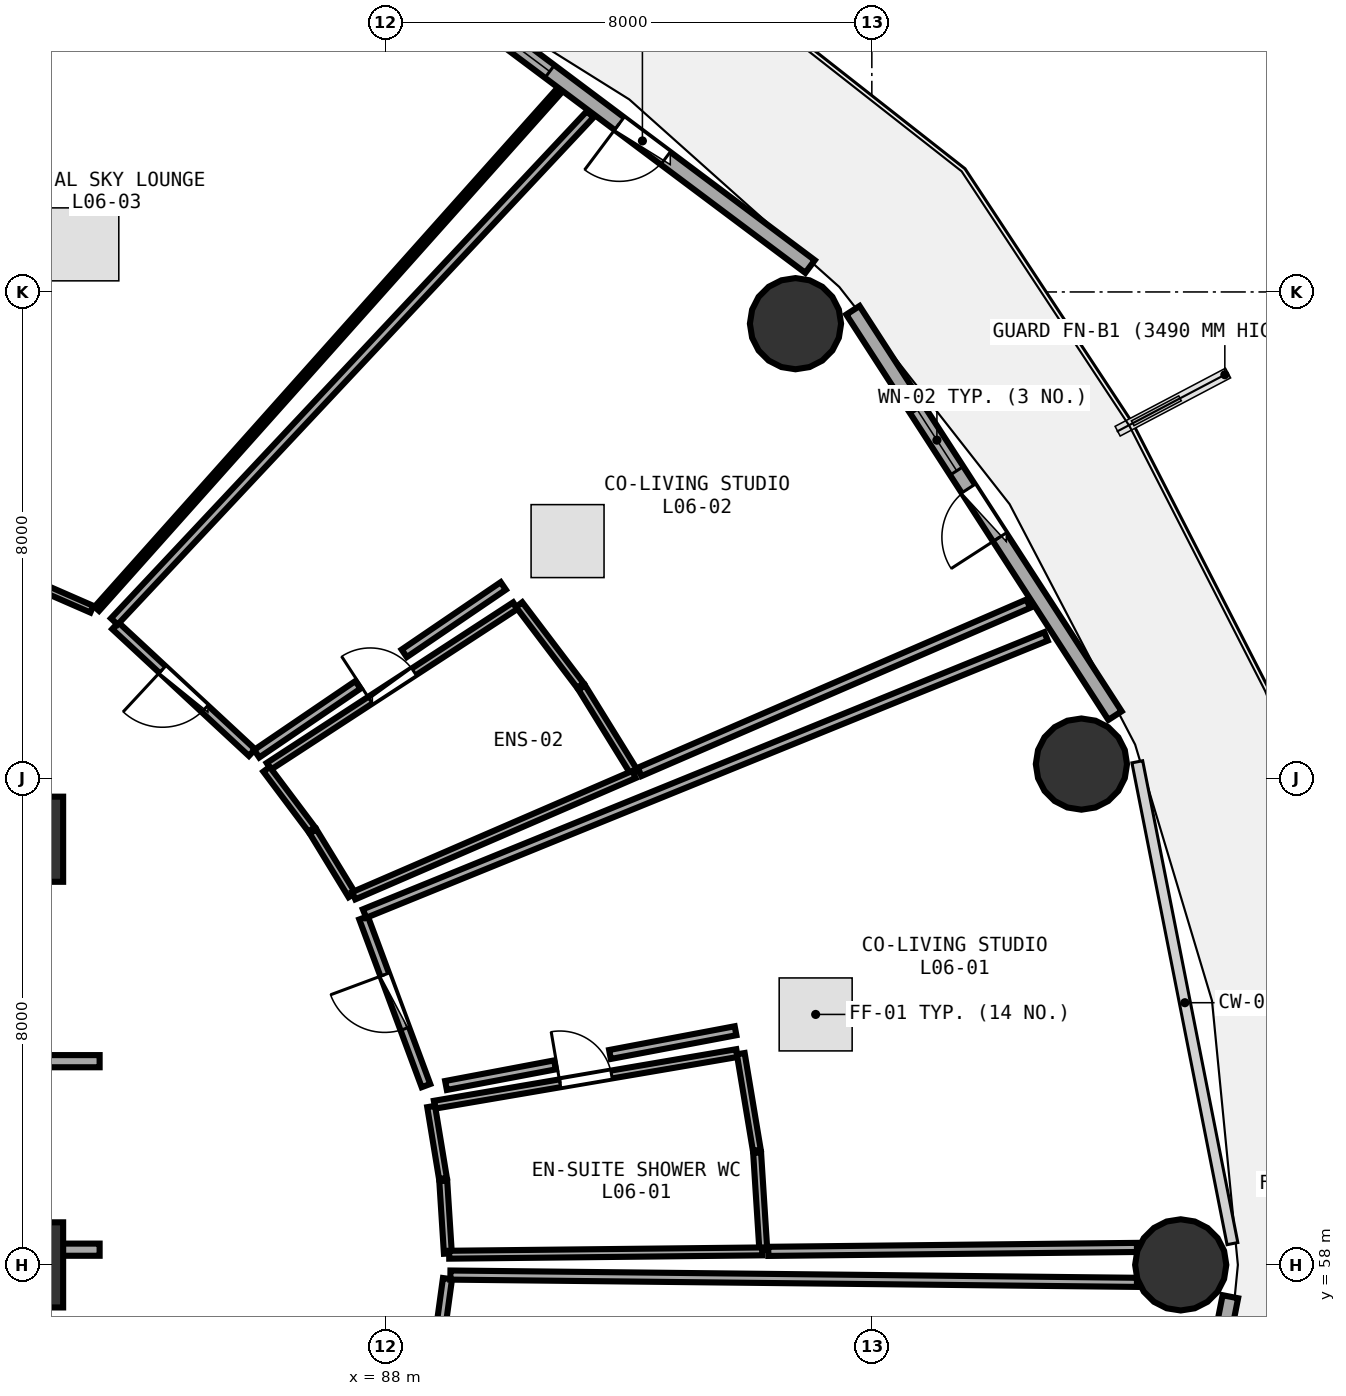
"""IFC4 building model, lengths in metres.
Left out: names, types, materials, properties, quantities, classifications, styles, units other than length and angle.
Written with IfcOpenShell. Run it as: python <this file> out.ifc"""

import sys

from ifc_helpers import new_model, si_unit, direction, frame, frame_2d, origin, origin_2d, place, context, subcontext, project, spatial, rectangle, circle, extrude, element, fill, save


model = new_model("IFC4")
c1 = context("Model", 3, precision=1e-05, world=origin(), true_north=direction((0.0, 1.0)))
c2 = subcontext(c1, "Body", "Model", "MODEL_VIEW")
j1 = project(units=[si_unit("LENGTHUNIT", "METRE"), si_unit("PLANEANGLEUNIT", "RADIAN")], contexts=[c1])
p1 = place(None, origin())
s1 = spatial("IfcSite", under=j1, at=p1, CompositionType="ELEMENT")
p2 = place(p1, origin())
s2 = spatial("IfcBuilding", under=s1, at=p2, CompositionType="ELEMENT")
p3 = place(p2, frame((0.0, 0.0, 26.25)))
s3 = spatial("IfcBuildingStorey", under=s2, at=p3, CompositionType="ELEMENT", Elevation=26.25)
for number, where, z_axis, x_axis in (
    (1, (82.0, 58.0, 0.0), (0.0, 0.0, 1.0), (1.0, 0.0, 0.0)),
    (2, (82.0, 65.0, 0.0), (0.0, 0.0, 1.0), (1.0, 0.0, 0.0)),
):
    element("IfcColumn", number, at=place(p3, frame(where, z_axis=z_axis, x_axis=x_axis)), inside=s3, PredefinedType="PILASTER", context=c2, shape_type="SweptSolid", body=[
        extrude(rectangle(XDim=1.4, YDim=1.4, at=origin_2d()), origin(), (0.0, 0.0, 1.0), 3.75),
    ])
for number, where, z_axis, x_axis in (
    (3, (101.08, 58.0, 0.0), (0.0, 0.0, 1.0), (1.0, 0.0, 0.0)),
    (4, (99.447, 66.236, 0.0), (0.0, 0.0, 1.0), (1.0, 0.0, 0.0)),
    (5, (94.744, 73.478, 0.0), (0.0, 0.0, 1.0), (1.0, 0.0, 0.0)),
):
    element("IfcColumn", number, at=place(p3, frame(where, z_axis=z_axis, x_axis=x_axis)), inside=s3, PredefinedType="COLUMN", context=c2, shape_type="SweptSolid", body=[
        extrude(circle(Radius=0.75, at=origin_2d()), origin(), (0.0, 0.0, 1.0), 3.75),
    ])
p4 = place(p3, frame((99.999, 67.033, 0.0), z_axis=(0.0, 0.0, 1.0), x_axis=(-0.543005114258, 0.839729388488, 0.0)))
e6 = element("IfcWall", 6, at=p4, inside=s3, PredefinedType="SOLIDWALL", context=c2, shape_type="SweptSolid", body=[
    extrude(rectangle(XDim=7.938, YDim=0.26, at=frame_2d((3.969, 0.0))), origin(), (0.0, 0.0, 1.0), 3.475),
])
p5 = place(p4, frame((3.494, 0.0, 0.0)))
e7 = element("IfcOpeningElement", 7, at=p5, cuts=e6, PredefinedType="OPENING", context=c2, shape_type="SweptSolid", body=[
    extrude(rectangle(XDim=0.95, YDim=2.1, at=frame_2d((0.475, 1.05))), frame((0.0, 0.14, 0.0), z_axis=(0.0, -1.0, 0.0), x_axis=(1.0, 0.0, 0.0)), (0.0, 0.0, 1.0), 0.28),
])
p6 = place(p4, frame((4.794, 0.0, 0.85)))
e8 = element("IfcOpeningElement", 8, at=p6, cuts=e6, PredefinedType="OPENING", context=c2, shape_type="SweptSolid", body=[
    extrude(rectangle(XDim=1.2, YDim=1.45, at=frame_2d((0.6, 0.725))), frame((0.0, 0.14, 0.0), z_axis=(0.0, -1.0, 0.0), x_axis=(1.0, 0.0, 0.0)), (0.0, 0.0, 1.0), 0.28),
])
p7 = place(p3, frame((94.984, 74.418, 0.0), z_axis=(0.0, 0.0, 1.0), x_axis=(-0.80030733173, 0.599590005569, 0.0)))
e9 = element("IfcWall", 9, at=p7, inside=s3, PredefinedType="SOLIDWALL", context=c2, shape_type="SweptSolid", body=[
    extrude(rectangle(XDim=8.291, YDim=0.26, at=frame_2d((4.145, 0.0))), origin(), (0.0, 0.0, 1.0), 3.475),
])
p8 = place(p7, frame((2.97, 0.0, 0.0)))
e10 = element("IfcOpeningElement", 10, at=p8, cuts=e9, PredefinedType="OPENING", context=c2, shape_type="SweptSolid", body=[
    extrude(rectangle(XDim=0.95, YDim=2.1, at=frame_2d((0.475, 1.05))), frame((0.0, 0.14, 0.0), z_axis=(0.0, -1.0, 0.0), x_axis=(1.0, 0.0, 0.0)), (0.0, 0.0, 1.0), 0.28),
])
p9 = place(p7, frame((5.35, 0.0, 0.85)))
e11 = element("IfcOpeningElement", 11, at=p9, cuts=e9, PredefinedType="OPENING", context=c2, shape_type="SweptSolid", body=[
    extrude(rectangle(XDim=1.2, YDim=1.45, at=frame_2d((0.6, 0.725))), frame((0.0, 0.14, 0.0), z_axis=(0.0, -1.0, 0.0), x_axis=(1.0, 0.0, 0.0)), (0.0, 0.0, 1.0), 0.28),
])
p10 = place(p3, frame((100.404, 49.92, 0.0), z_axis=(0.0, 0.0, 1.0), x_axis=(0.193726159581, 0.98105564322, 0.0)))
e12 = element("IfcWall", 12, at=p10, inside=s3, PredefinedType="SOLIDWALL", context=c2, shape_type="SweptSolid", body=[
    extrude(rectangle(XDim=7.703, YDim=0.26, at=frame_2d((3.851, 0.0))), origin(), (0.0, 0.0, 1.0), 3.475),
])
p11 = place(p10, frame((3.051, 0.0, 0.85)))
e13 = element("IfcOpeningElement", 13, at=p11, cuts=e12, PredefinedType="OPENING", context=c2, shape_type="SweptSolid", body=[
    extrude(rectangle(XDim=1.6, YDim=1.45, at=frame_2d((0.8, 0.725))), frame((0.0, 0.14, 0.0), z_axis=(0.0, -1.0, 0.0), x_axis=(1.0, 0.0, 0.0)), (0.0, 0.0, 1.0), 0.28),
])
p12 = place(p3, frame((79.3, 61.35, 0.0), z_axis=(0.0, 0.0, 1.0), x_axis=(1.0, 0.0, 0.0)))
e14 = element("IfcWall", 14, at=p12, inside=s3, PredefinedType="SOLIDWALL", context=c2, shape_type="SweptSolid", body=[
    extrude(rectangle(XDim=4.0, YDim=0.2, at=frame_2d((2.0, 0.0))), origin(), (0.0, 0.0, 1.0), 2.775),
])
p13 = place(p12, frame((0.45, 0.0, 0.0)))
e15 = element("IfcOpeningElement", 15, at=p13, cuts=e14, PredefinedType="OPENING", context=c2, shape_type="SweptSolid", body=[
    extrude(rectangle(XDim=1.2, YDim=2.15, at=frame_2d((0.6, 1.075))), frame((0.0, 0.11, 0.0), z_axis=(0.0, -1.0, 0.0), x_axis=(1.0, 0.0, 0.0)), (0.0, 0.0, 1.0), 0.22),
])
p14 = place(p3, frame((79.3, 58.25, 0.0), z_axis=(0.0, 0.0, 1.0), x_axis=(1.0, 0.0, 0.0)))
e16 = element("IfcWall", 16, at=p14, inside=s3, PredefinedType="SOLIDWALL", context=c2, shape_type="SweptSolid", body=[
    extrude(rectangle(XDim=4.0, YDim=0.2, at=frame_2d((2.0, 0.0))), origin(), (0.0, 0.0, 1.0), 2.775),
])
p15 = place(p14, frame((0.5, 0.0, 0.0)))
e17 = element("IfcOpeningElement", 17, at=p15, cuts=e16, PredefinedType="OPENING", context=c2, shape_type="SweptSolid", body=[
    extrude(rectangle(XDim=1.1, YDim=2.1, at=frame_2d((0.55, 1.05))), frame((0.0, 0.11, 0.0), z_axis=(0.0, -1.0, 0.0), x_axis=(1.0, 0.0, 0.0)), (0.0, 0.0, 1.0), 0.22),
])
p16 = place(p3, frame((88.808, 60.634, 0.0), z_axis=(0.0, 0.0, 1.0), x_axis=(0.985746995542, 0.168234540986, 0.0)))
e18 = element("IfcWall", 18, at=p16, inside=s3, PredefinedType="PLUMBINGWALL", context=c2, shape_type="SweptSolid", body=[
    extrude(rectangle(XDim=5.046, YDim=0.13, at=frame_2d((2.523, 0.0))), origin(), (0.0, 0.0, 1.0), 3.175),
])
p17 = place(p16, frame((2.093, 0.0, 0.0)))
e19 = element("IfcOpeningElement", 19, at=p17, cuts=e18, PredefinedType="OPENING", context=c2, shape_type="SweptSolid", body=[
    extrude(rectangle(XDim=0.86, YDim=2.05, at=frame_2d((0.43, 1.025))), frame((0.0, 0.075, 0.0), z_axis=(0.0, -1.0, 0.0), x_axis=(1.0, 0.0, 0.0)), (0.0, 0.0, 1.0), 0.15),
])
p18 = place(p3, frame((88.667, 60.948, 0.0), z_axis=(0.0, 0.0, 1.0), x_axis=(-0.348640514247, 0.937256524024, 0.0)))
e20 = element("IfcWall", 20, at=p18, inside=s3, PredefinedType="PARTITIONING", context=c2, shape_type="SweptSolid", body=[
    extrude(rectangle(XDim=2.943, YDim=0.15, at=frame_2d((1.472, 0.0))), origin(), (0.0, 0.0, 1.0), 3.48),
])
p19 = place(p18, frame((0.997, 0.0, 0.0)))
e21 = element("IfcOpeningElement", 21, at=p19, cuts=e20, PredefinedType="OPENING", context=c2, shape_type="SweptSolid", body=[
    extrude(rectangle(XDim=0.95, YDim=2.08, at=frame_2d((0.475, 1.04))), frame((0.0, 0.085, 0.0), z_axis=(0.0, -1.0, 0.0), x_axis=(1.0, 0.0, 0.0)), (0.0, 0.0, 1.0), 0.17),
])
p20 = place(p3, frame((86.083, 66.2, 0.0), z_axis=(0.0, 0.0, 1.0), x_axis=(0.837796261941, 0.545982988267, 0.0)))
e22 = element("IfcWall", 22, at=p20, inside=s3, PredefinedType="PLUMBINGWALL", context=c2, shape_type="SweptSolid", body=[
    extrude(rectangle(XDim=4.838, YDim=0.13, at=frame_2d((2.419, 0.0))), origin(), (0.0, 0.0, 1.0), 3.235),
])
p21 = place(p20, frame((1.989, 0.0, 0.0)))
e23 = element("IfcOpeningElement", 23, at=p21, cuts=e22, PredefinedType="OPENING", context=c2, shape_type="SweptSolid", body=[
    extrude(rectangle(XDim=0.86, YDim=2.05, at=frame_2d((0.43, 1.025))), frame((0.0, 0.075, 0.0), z_axis=(0.0, -1.0, 0.0), x_axis=(1.0, 0.0, 0.0)), (0.0, 0.0, 1.0), 0.15),
])
p22 = place(p3, frame((85.806, 66.425, 0.0), z_axis=(0.0, 0.0, 1.0), x_axis=(-0.7329267348, 0.680307578538, 0.0)))
e24 = element("IfcWall", 24, at=p22, inside=s3, PredefinedType="PARTITIONING", context=c2, shape_type="SweptSolid", body=[
    extrude(rectangle(XDim=3.067, YDim=0.15, at=frame_2d((1.533, 0.0))), origin(), (0.0, 0.0, 1.0), 2.875),
])
p23 = place(p22, frame((1.059, 0.0, 0.0)))
e25 = element("IfcOpeningElement", 25, at=p23, cuts=e24, PredefinedType="OPENING", context=c2, shape_type="SweptSolid", body=[
    extrude(rectangle(XDim=0.95, YDim=2.08, at=frame_2d((0.475, 1.04))), frame((0.0, 0.085, 0.0), z_axis=(0.0, -1.0, 0.0), x_axis=(1.0, 0.0, 0.0)), (0.0, 0.0, 1.0), 0.17),
])
p24 = place(p3, frame((83.172, 68.783, 0.0), z_axis=(0.0, 0.0, 1.0), x_axis=(-0.916419655578, 0.400218708797, 0.0)))
e26 = element("IfcWall", 26, at=p24, inside=s3, PredefinedType="PARTITIONING", context=c2, shape_type="SweptSolid", body=[
    extrude(rectangle(XDim=6.104, YDim=0.12, at=frame_2d((3.052, 0.0))), origin(), (0.0, 0.0, 1.0), 2.875),
])
p25 = place(p24, frame((2.602, 0.0, 0.0)))
e27 = element("IfcOpeningElement", 27, at=p25, cuts=e26, PredefinedType="OPENING", context=c2, shape_type="SweptSolid", body=[
    extrude(rectangle(XDim=0.9, YDim=2.08, at=frame_2d((0.45, 1.04))), frame((0.0, 0.07, 0.0), z_axis=(0.0, -1.0, 0.0), x_axis=(1.0, 0.0, 0.0)), (0.0, 0.0, 1.0), 0.14),
])
p26 = place(p3, frame((88.625, 54.885, 0.0), z_axis=(0.0, 0.0, 1.0), x_axis=(0.135838186105, 0.990731036758, 0.0)))
e28 = element("IfcWall", 28, at=p26, inside=s3, PredefinedType="PARTITIONING", context=c2, shape_type="SweptSolid", body=[
    extrude(rectangle(XDim=2.915, YDim=0.15, at=frame_2d((1.458, 0.0))), origin(), (0.0, 0.0, 1.0), 3.48),
])
p27 = place(p26, frame((0.983, 0.0, 0.0)))
e29 = element("IfcOpeningElement", 29, at=p27, cuts=e28, PredefinedType="OPENING", context=c2, shape_type="SweptSolid", body=[
    extrude(rectangle(XDim=0.95, YDim=2.08, at=frame_2d((0.475, 1.04))), frame((0.0, 0.085, 0.0), z_axis=(0.0, -1.0, 0.0), x_axis=(1.0, 0.0, 0.0)), (0.0, 0.0, 1.0), 0.17),
])
p28 = place(p3, frame((89.028, 58.187, 0.0), z_axis=(0.0, 0.0, 1.0), x_axis=(-0.063661240763, 0.99797156594, 0.0)))
e30 = element("IfcWall", 30, at=p28, inside=s3, PredefinedType="PLUMBINGWALL", context=c2, shape_type="SweptSolid", body=[
    extrude(rectangle(XDim=1.197, YDim=0.13, at=frame_2d((0.598, 0.0))), origin(), (0.0, 0.0, 1.0), 2.875),
])
p29 = place(p3, frame((88.947, 59.421, 0.0), z_axis=(0.0, 0.0, 1.0), x_axis=(-0.162220174474, 0.986754587014, 0.0)))
e31 = element("IfcWall", 31, at=p29, inside=s3, PredefinedType="PLUMBINGWALL", context=c2, shape_type="SweptSolid", body=[
    extrude(rectangle(XDim=1.199, YDim=0.13, at=frame_2d((0.6, 0.0))), origin(), (0.0, 0.0, 1.0), 3.48),
])
p30 = place(p3, frame((93.844, 61.473, 0.0), z_axis=(0.0, 0.0, 1.0), x_axis=(0.16417773594, -0.986430773558, 0.0)))
e32 = element("IfcWall", 32, at=p30, inside=s3, PredefinedType="PLUMBINGWALL", context=c2, shape_type="SweptSolid", body=[
    extrude(rectangle(XDim=1.611, YDim=0.13, at=frame_2d((0.805, 0.0))), origin(), (0.0, 0.0, 1.0), 3.48),
])
p31 = place(p3, frame((94.113, 59.845, 0.0), z_axis=(0.0, 0.0, 1.0), x_axis=(0.06383542257, -0.997960439509, 0.0)))
e33 = element("IfcWall", 33, at=p31, inside=s3, PredefinedType="PLUMBINGWALL", context=c2, shape_type="SweptSolid", body=[
    extrude(rectangle(XDim=1.606, YDim=0.13, at=frame_2d((0.803, 0.0))), origin(), (0.0, 0.0, 1.0), 3.48),
])
p32 = place(p3, frame((94.197, 58.222, 0.0), z_axis=(0.0, 0.0, 1.0), x_axis=(-0.999944081579, -0.010575146078, 0.0)))
e34 = element("IfcWall", 34, at=p32, inside=s3, PredefinedType="PLUMBINGWALL", context=c2, shape_type="SweptSolid", body=[
    extrude(rectangle(XDim=5.148, YDim=0.13, at=frame_2d((2.574, 0.0))), origin(), (0.0, 0.0, 1.0), 2.875),
])
p33 = place(p3, frame((87.657, 63.778, 0.0), z_axis=(0.0, 0.0, 1.0), x_axis=(0.926333713065, 0.376703931542, 0.0)))
e35 = element("IfcWall", 35, at=p33, inside=s3, PredefinedType="PARTITIONING", context=c2, shape_type="SweptSolid", body=[
    extrude(rectangle(XDim=12.099, YDim=0.15, at=frame_2d((6.05, 0.0))), origin(), (0.0, 0.0, 1.0), 2.875),
])
p34 = place(p3, frame((100.36, 58.287, 0.0), z_axis=(0.0, 0.0, 1.0), x_axis=(-0.999943071294, -0.010670246996, 0.0)))
e36 = element("IfcWall", 36, at=p34, inside=s3, PredefinedType="PARTITIONING", context=c2, shape_type="SweptSolid", body=[
    extrude(rectangle(XDim=6.063, YDim=0.15, at=frame_2d((3.032, 0.0))), origin(), (0.0, 0.0, 1.0), 3.235),
])
p35 = place(p3, frame((93.759, 61.851, 0.0), z_axis=(0.0, 0.0, 1.0), x_axis=(-0.98260291219, -0.185718919219, 0.0)))
e37 = element("IfcWall", 37, at=p35, inside=s3, PredefinedType="PARTITIONING", context=c2, shape_type="SweptSolid", body=[
    extrude(rectangle(XDim=2.102, YDim=0.15, at=frame_2d((1.051, 0.0))), origin(), (0.0, 0.0, 1.0), 3.175),
])
p36 = place(p3, frame((90.789, 61.289, 0.0), z_axis=(0.0, 0.0, 1.0), x_axis=(-0.98259072308, -0.185783397852, 0.0)))
e38 = element("IfcWall", 38, at=p36, inside=s3, PredefinedType="PARTITIONING", context=c2, shape_type="SweptSolid", body=[
    extrude(rectangle(XDim=1.824, YDim=0.15, at=frame_2d((0.912, 0.0))), origin(), (0.0, 0.0, 1.0), 3.235),
])
p37 = place(p3, frame((87.451, 64.08, 0.0), z_axis=(0.0, 0.0, 1.0), x_axis=(-0.52146609248, 0.853272004928, 0.0)))
e39 = element("IfcWall", 39, at=p37, inside=s3, PredefinedType="PLUMBINGWALL", context=c2, shape_type="SweptSolid", body=[
    extrude(rectangle(XDim=1.228, YDim=0.13, at=frame_2d((0.614, 0.0))), origin(), (0.0, 0.0, 1.0), 3.48),
])
p38 = place(p3, frame((86.788, 65.161, 0.0), z_axis=(0.0, 0.0, 1.0), x_axis=(-0.600347056143, 0.79973959023, 0.0)))
e40 = element("IfcWall", 40, at=p38, inside=s3, PredefinedType="PLUMBINGWALL", context=c2, shape_type="SweptSolid", body=[
    extrude(rectangle(XDim=1.238, YDim=0.13, at=frame_2d((0.619, 0.0))), origin(), (0.0, 0.0, 1.0), 2.875),
])
p39 = place(p3, frame((90.199, 68.858, 0.0), z_axis=(0.0, 0.0, 1.0), x_axis=(0.60376191721, -0.797164692725, 0.0)))
e41 = element("IfcWall", 41, at=p39, inside=s3, PredefinedType="PLUMBINGWALL", context=c2, shape_type="SweptSolid", body=[
    extrude(rectangle(XDim=1.669, YDim=0.13, at=frame_2d((0.834, 0.0))), origin(), (0.0, 0.0, 1.0), 3.175),
])
p40 = place(p3, frame((91.229, 67.495, 0.0), z_axis=(0.0, 0.0, 1.0), x_axis=(0.525540089642, -0.850768837099, 0.0)))
e42 = element("IfcWall", 42, at=p40, inside=s3, PredefinedType="PLUMBINGWALL", context=c2, shape_type="SweptSolid", body=[
    extrude(rectangle(XDim=1.651, YDim=0.13, at=frame_2d((0.826, 0.0))), origin(), (0.0, 0.0, 1.0), 3.175),
])
p41 = place(p3, frame((92.09, 66.065, 0.0), z_axis=(0.0, 0.0, 1.0), x_axis=(-0.917797204715, -0.397049481826, 0.0)))
e43 = element("IfcWall", 43, at=p41, inside=s3, PredefinedType="PLUMBINGWALL", context=c2, shape_type="SweptSolid", body=[
    extrude(rectangle(XDim=5.023, YDim=0.13, at=frame_2d((2.511, 0.0))), origin(), (0.0, 0.0, 1.0), 2.875),
])
p42 = place(p3, frame((83.542, 68.581, 0.0), z_axis=(0.0, 0.0, 1.0), x_axis=(0.684261294523, 0.729236916796, 0.0)))
e44 = element("IfcWall", 44, at=p42, inside=s3, PredefinedType="PARTITIONING", context=c2, shape_type="SweptSolid", body=[
    extrude(rectangle(XDim=11.438, YDim=0.15, at=frame_2d((5.719, 0.0))), origin(), (0.0, 0.0, 1.0), 2.875),
])
p43 = place(p3, frame((98.574, 68.874, 0.0), z_axis=(0.0, 0.0, 1.0), x_axis=(-0.917736225937, -0.397190407239, 0.0)))
e45 = element("IfcWall", 45, at=p43, inside=s3, PredefinedType="PARTITIONING", context=c2, shape_type="SweptSolid", body=[
    extrude(rectangle(XDim=6.967, YDim=0.15, at=frame_2d((3.483, 0.0))), origin(), (0.0, 0.0, 1.0), 2.875),
])
p44 = place(p3, frame((89.939, 69.166, 0.0), z_axis=(0.0, 0.0, 1.0), x_axis=(-0.826811291248, -0.562479411769, 0.0)))
e46 = element("IfcWall", 46, at=p44, inside=s3, PredefinedType="PARTITIONING", context=c2, shape_type="SweptSolid", body=[
    extrude(rectangle(XDim=1.971, YDim=0.15, at=frame_2d((0.985, 0.0))), origin(), (0.0, 0.0, 1.0), 3.48),
])
p45 = place(p3, frame((87.549, 67.539, 0.0), z_axis=(0.0, 0.0, 1.0), x_axis=(-0.826867883695, -0.562396215237, 0.0)))
e47 = element("IfcWall", 47, at=p45, inside=s3, PredefinedType="PARTITIONING", context=c2, shape_type="SweptSolid", body=[
    extrude(rectangle(XDim=2.014, YDim=0.15, at=frame_2d((1.007, 0.0))), origin(), (0.0, 0.0, 1.0), 3.235),
])
p46 = place(p3, frame((90.844, 77.294, 0.0), z_axis=(0.0, 0.0, 1.0), x_axis=(-0.66580890104, -0.746122313897, 0.0)))
e48 = element("IfcWall", 48, at=p46, inside=s3, PredefinedType="PARTITIONING", context=c2, shape_type="SweptSolid", body=[
    extrude(rectangle(XDim=11.399, YDim=0.1, at=frame_2d((5.7, 0.0))), origin(), (0.0, 0.0, 1.0), 2.875),
])
p47 = place(p3, frame((89.069, 57.833, 0.0), z_axis=(0.0, 0.0, 1.0), x_axis=(0.999943877154, -0.010594458135, 0.0)))
e49 = element("IfcWall", 49, at=p47, inside=s3, PredefinedType="PARTITIONING", context=c2, shape_type="SweptSolid", body=[
    extrude(rectangle(XDim=11.292, YDim=0.15, at=frame_2d((5.646, 0.0))), origin(), (0.0, 0.0, 1.0), 2.875),
])
p48 = place(p5, frame((0.95, 0.0, 0.0), z_axis=(0.0, 0.0, 1.0), x_axis=(-1.0, 0.0, 0.0)))
e50 = element("IfcDoor", 50, at=p48, inside=s3, OperationType="SINGLE_SWING_RIGHT", PredefinedType="DOOR", context=c2, shape_type="SweptSolid", body=[
    extrude(rectangle(XDim=0.95, YDim=2.1, at=frame_2d((0.475, 1.05))), frame((0.0, 0.025, 0.0), z_axis=(0.0, -1.0, 0.0), x_axis=(1.0, 0.0, 0.0)), (0.0, 0.0, 1.0), 0.05),
])
fill(e7, e50)
p49 = place(p6, origin())
e51 = element("IfcWindow", 51, at=p49, inside=s3, PartitioningType="SINGLE_PANEL", PredefinedType="WINDOW", context=c2, shape_type="SweptSolid", body=[
    extrude(rectangle(XDim=1.2, YDim=1.45, at=frame_2d((0.6, 0.725))), frame((0.0, 0.03, 0.0), z_axis=(0.0, -1.0, 0.0), x_axis=(1.0, 0.0, 0.0)), (0.0, 0.0, 1.0), 0.06),
])
fill(e8, e51)
p50 = place(p8, frame((0.95, 0.0, 0.0), z_axis=(0.0, 0.0, 1.0), x_axis=(-1.0, 0.0, 0.0)))
e52 = element("IfcDoor", 52, at=p50, inside=s3, OperationType="SINGLE_SWING_LEFT", PredefinedType="DOOR", context=c2, shape_type="SweptSolid", body=[
    extrude(rectangle(XDim=0.95, YDim=2.1, at=frame_2d((0.475, 1.05))), frame((0.0, 0.025, 0.0), z_axis=(0.0, -1.0, 0.0), x_axis=(1.0, 0.0, 0.0)), (0.0, 0.0, 1.0), 0.05),
])
fill(e10, e52)
p51 = place(p9, origin())
e53 = element("IfcWindow", 53, at=p51, inside=s3, PartitioningType="SINGLE_PANEL", PredefinedType="WINDOW", context=c2, shape_type="SweptSolid", body=[
    extrude(rectangle(XDim=1.2, YDim=1.45, at=frame_2d((0.6, 0.725))), frame((0.0, 0.03, 0.0), z_axis=(0.0, -1.0, 0.0), x_axis=(1.0, 0.0, 0.0)), (0.0, 0.0, 1.0), 0.06),
])
fill(e11, e53)
p52 = place(p17, origin())
e54 = element("IfcDoor", 54, at=p52, inside=s3, OperationType="SINGLE_SWING_LEFT", PredefinedType="DOOR", context=c2, shape_type="SweptSolid", body=[
    extrude(rectangle(XDim=0.86, YDim=2.05, at=frame_2d((0.43, 1.025))), frame((0.0, 0.025, 0.0), z_axis=(0.0, -1.0, 0.0), x_axis=(1.0, 0.0, 0.0)), (0.0, 0.0, 1.0), 0.05),
])
fill(e19, e54)
p53 = place(p19, origin())
e55 = element("IfcDoor", 55, at=p53, inside=s3, OperationType="SINGLE_SWING_RIGHT", PredefinedType="DOOR", context=c2, shape_type="SweptSolid", body=[
    extrude(rectangle(XDim=0.95, YDim=2.08, at=frame_2d((0.475, 1.04))), frame((0.0, 0.025, 0.0), z_axis=(0.0, -1.0, 0.0), x_axis=(1.0, 0.0, 0.0)), (0.0, 0.0, 1.0), 0.05),
])
fill(e21, e55)
p54 = place(p21, origin())
e56 = element("IfcDoor", 56, at=p54, inside=s3, OperationType="SINGLE_SWING_LEFT", PredefinedType="DOOR", context=c2, shape_type="SweptSolid", body=[
    extrude(rectangle(XDim=0.86, YDim=2.05, at=frame_2d((0.43, 1.025))), frame((0.0, 0.025, 0.0), z_axis=(0.0, -1.0, 0.0), x_axis=(1.0, 0.0, 0.0)), (0.0, 0.0, 1.0), 0.05),
])
fill(e23, e56)
p55 = place(p23, origin())
e57 = element("IfcDoor", 57, at=p55, inside=s3, OperationType="SINGLE_SWING_RIGHT", PredefinedType="DOOR", context=c2, shape_type="SweptSolid", body=[
    extrude(rectangle(XDim=0.95, YDim=2.08, at=frame_2d((0.475, 1.04))), frame((0.0, 0.025, 0.0), z_axis=(0.0, -1.0, 0.0), x_axis=(1.0, 0.0, 0.0)), (0.0, 0.0, 1.0), 0.05),
])
fill(e25, e57)
save(model, sys.argv[1])
